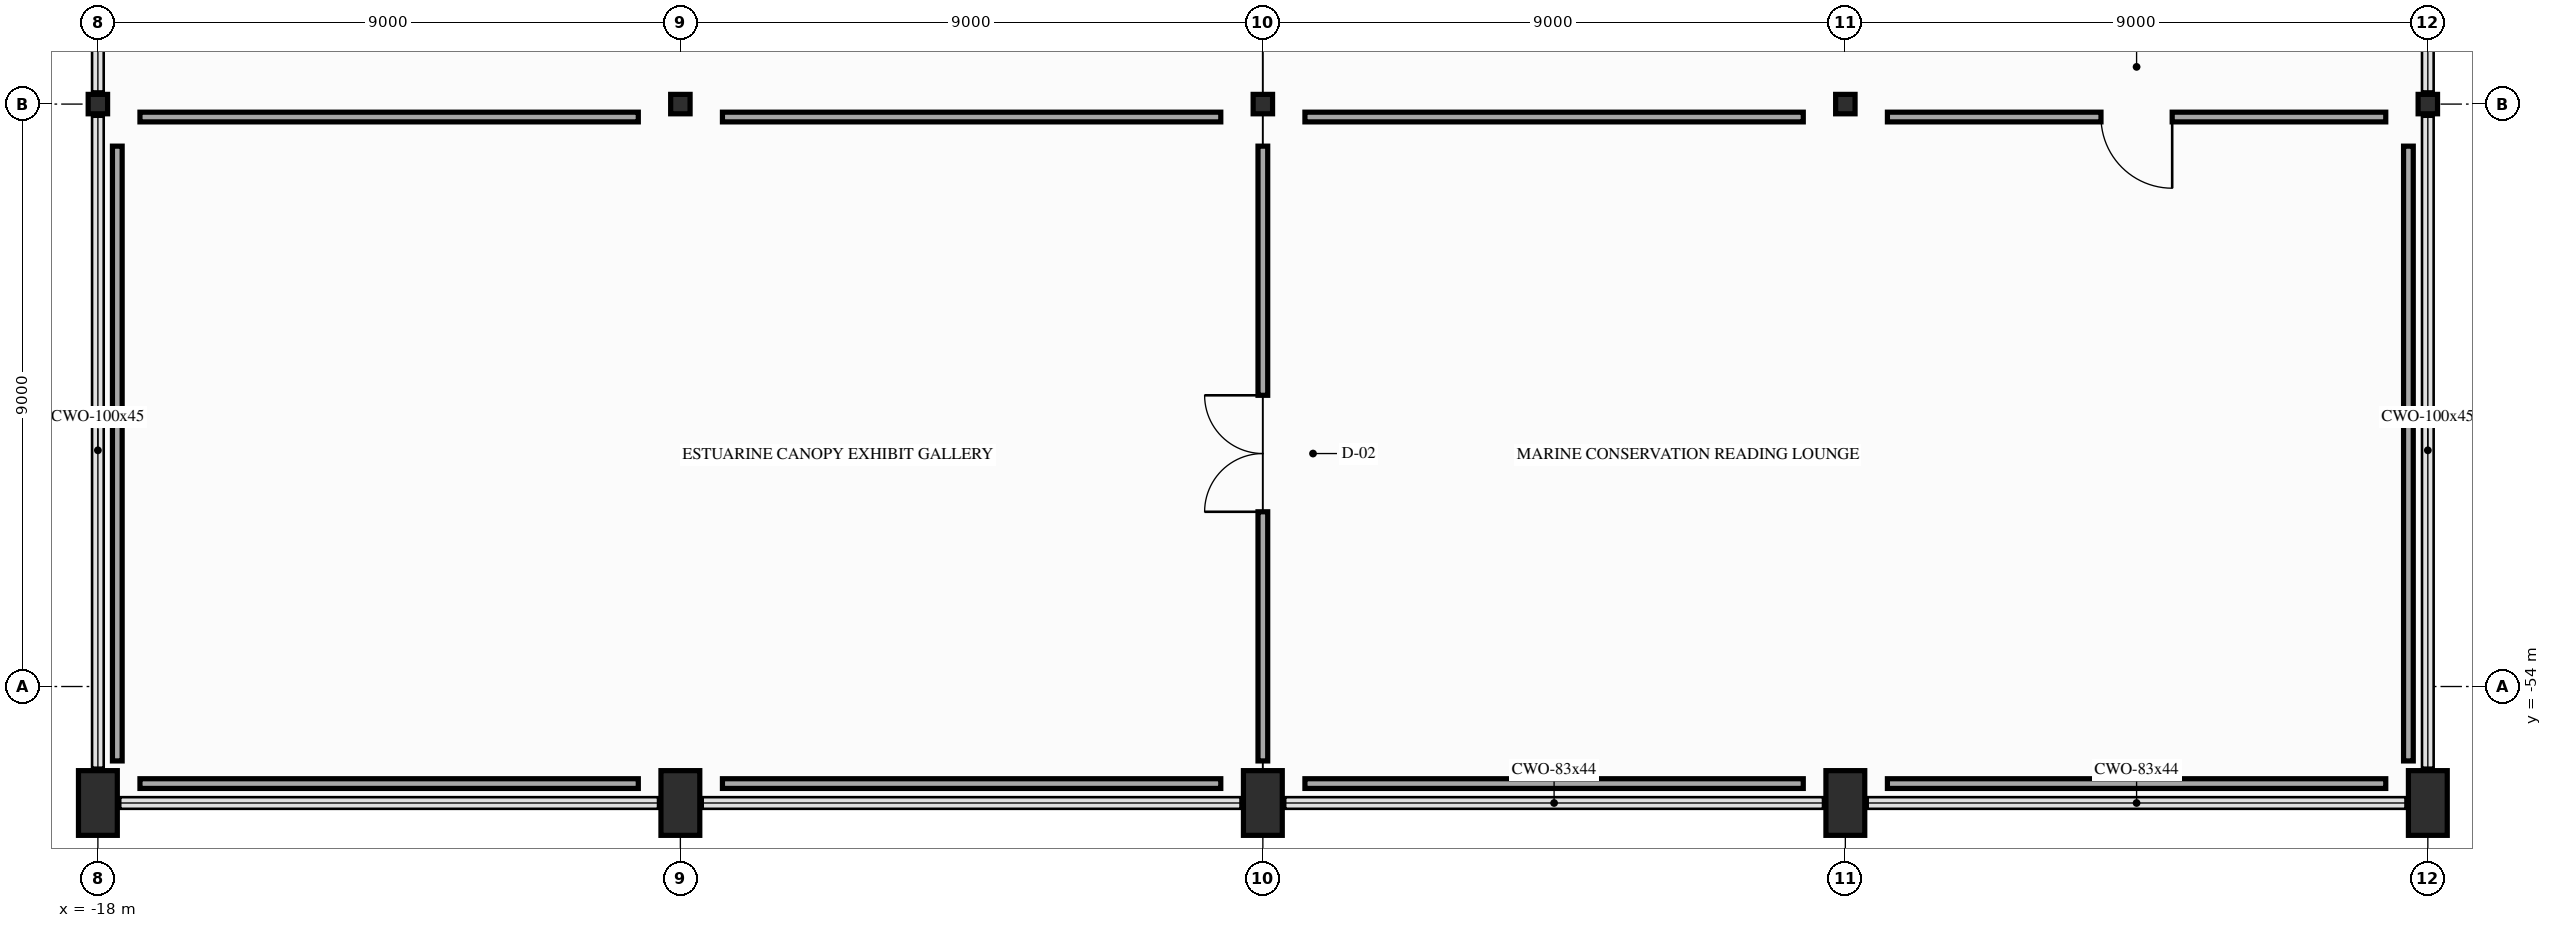
"""IFC4 building model, lengths in metres.
Left out: names, types, materials, properties, quantities, classifications, styles, units other than length and angle.
Written with IfcOpenShell. Run it as: python <this file> out.ifc"""

import sys

from ifc_helpers import new_model, si_unit, direction, frame, frame_2d, origin, origin_2d, place, context, subcontext, project, spatial, rectangle, i_section, extrude, element, fill, save


model = new_model("IFC4")
c1 = context("Model", 3, precision=1e-05, world=origin(), true_north=direction((0.0, 1.0)))
c2 = subcontext(c1, "Body", "Model", "MODEL_VIEW")
j1 = project(units=[si_unit("LENGTHUNIT", "METRE"), si_unit("PLANEANGLEUNIT", "RADIAN")], contexts=[c1])
p1 = place(None, origin())
s1 = spatial("IfcSite", under=j1, at=p1, CompositionType="ELEMENT")
p2 = place(p1, origin())
s2 = spatial("IfcBuilding", under=s1, at=p2, CompositionType="ELEMENT")
p3 = place(p2, frame((0.0, 0.0, 10.8)))
s3 = spatial("IfcBuildingStorey", under=s2, at=p3, CompositionType="ELEMENT", Elevation=10.8)
p4 = place(p3, frame((-18.0, -55.8, 0.0), z_axis=(0.0, 0.0, 1.0), x_axis=(1.0, 0.0, 0.0)))
e1 = element("IfcColumn", 1, at=p4, inside=s3, PredefinedType="PILASTER", context=c2, shape_type="SweptSolid", body=[
    extrude(rectangle(XDim=0.6, YDim=1.0, at=origin_2d()), origin(), (0.0, 0.0, 1.0), 5.4),
])
p5 = place(p3, frame((-18.0, -45.0, 0.0), z_axis=(0.0, 0.0, 1.0), x_axis=(1.0, 0.0, 0.0)))
e2 = element("IfcColumn", 2, at=p5, inside=s3, PredefinedType="COLUMN", context=c2, shape_type="SweptSolid", body=[
    extrude(i_section(OverallWidth=0.3, OverallDepth=0.3, WebThickness=0.01, FlangeThickness=0.015, FilletRadius=0.018, at=origin_2d()), origin(), (0.0, 0.0, 1.0), 5.4),
])
p6 = place(p3, frame((-9.0, -55.8, 0.0), z_axis=(0.0, 0.0, 1.0), x_axis=(1.0, 0.0, 0.0)))
e3 = element("IfcColumn", 3, at=p6, inside=s3, PredefinedType="PILASTER", context=c2, shape_type="SweptSolid", body=[
    extrude(rectangle(XDim=0.6, YDim=1.0, at=origin_2d()), origin(), (0.0, 0.0, 1.0), 5.4),
])
p7 = place(p3, frame((-9.0, -45.0, 0.0), z_axis=(0.0, 0.0, 1.0), x_axis=(1.0, 0.0, 0.0)))
e4 = element("IfcColumn", 4, at=p7, inside=s3, PredefinedType="COLUMN", context=c2, shape_type="SweptSolid", body=[
    extrude(i_section(OverallWidth=0.3, OverallDepth=0.3, WebThickness=0.01, FlangeThickness=0.015, FilletRadius=0.018, at=origin_2d()), origin(), (0.0, 0.0, 1.0), 5.4),
])
p8 = place(p3, frame((0.0, -55.8, 0.0), z_axis=(0.0, 0.0, 1.0), x_axis=(1.0, 0.0, 0.0)))
e5 = element("IfcColumn", 5, at=p8, inside=s3, PredefinedType="PILASTER", context=c2, shape_type="SweptSolid", body=[
    extrude(rectangle(XDim=0.6, YDim=1.0, at=origin_2d()), origin(), (0.0, 0.0, 1.0), 5.4),
])
p9 = place(p3, frame((0.0, -45.0, 0.0), z_axis=(0.0, 0.0, 1.0), x_axis=(1.0, 0.0, 0.0)))
e6 = element("IfcColumn", 6, at=p9, inside=s3, PredefinedType="COLUMN", context=c2, shape_type="SweptSolid", body=[
    extrude(i_section(OverallWidth=0.3, OverallDepth=0.3, WebThickness=0.01, FlangeThickness=0.015, FilletRadius=0.018, at=origin_2d()), origin(), (0.0, 0.0, 1.0), 5.4),
])
p10 = place(p3, frame((9.0, -55.8, 0.0), z_axis=(0.0, 0.0, 1.0), x_axis=(1.0, 0.0, 0.0)))
e7 = element("IfcColumn", 7, at=p10, inside=s3, PredefinedType="PILASTER", context=c2, shape_type="SweptSolid", body=[
    extrude(rectangle(XDim=0.6, YDim=1.0, at=origin_2d()), origin(), (0.0, 0.0, 1.0), 5.4),
])
p11 = place(p3, frame((9.0, -45.0, 0.0), z_axis=(0.0, 0.0, 1.0), x_axis=(1.0, 0.0, 0.0)))
e8 = element("IfcColumn", 8, at=p11, inside=s3, PredefinedType="COLUMN", context=c2, shape_type="SweptSolid", body=[
    extrude(i_section(OverallWidth=0.3, OverallDepth=0.3, WebThickness=0.01, FlangeThickness=0.015, FilletRadius=0.018, at=origin_2d()), origin(), (0.0, 0.0, 1.0), 5.4),
])
p12 = place(p3, frame((18.0, -55.8, 0.0), z_axis=(0.0, 0.0, 1.0), x_axis=(1.0, 0.0, 0.0)))
e9 = element("IfcColumn", 9, at=p12, inside=s3, PredefinedType="PILASTER", context=c2, shape_type="SweptSolid", body=[
    extrude(rectangle(XDim=0.6, YDim=1.0, at=origin_2d()), origin(), (0.0, 0.0, 1.0), 5.4),
])
p13 = place(p3, frame((18.0, -45.0, 0.0), z_axis=(0.0, 0.0, 1.0), x_axis=(1.0, 0.0, 0.0)))
e10 = element("IfcColumn", 10, at=p13, inside=s3, PredefinedType="COLUMN", context=c2, shape_type="SweptSolid", body=[
    extrude(i_section(OverallWidth=0.3, OverallDepth=0.3, WebThickness=0.01, FlangeThickness=0.015, FilletRadius=0.018, at=origin_2d()), origin(), (0.0, 0.0, 1.0), 5.4),
])
for number, where, z_axis, x_axis in (
    (11, (-17.35, -55.5, 0.0), (0.0, 0.0, 1.0), (1.0, 0.0, 0.0)),
    (12, (-8.35, -55.5, 0.0), (0.0, 0.0, 1.0), (1.0, 0.0, 0.0)),
):
    element("IfcWall", number, at=place(p3, frame(where, z_axis=z_axis, x_axis=x_axis)), inside=s3, PredefinedType="PARTITIONING", context=c2, shape_type="SweptSolid", body=[
        extrude(rectangle(XDim=7.7, YDim=0.15, at=frame_2d((3.85, 0.0))), origin(), (0.0, 0.0, 1.0), 4.447),
    ])
p14 = place(p3, frame((0.0, -55.15, 0.0), z_axis=(0.0, 0.0, 1.0), x_axis=(0.0, 1.0, 0.0)))
e13 = element("IfcWall", 13, at=p14, inside=s3, PredefinedType="PARTITIONING", context=c2, shape_type="SweptSolid", body=[
    extrude(rectangle(XDim=9.5, YDim=0.15, at=frame_2d((4.75, 0.0))), origin(), (0.0, 0.0, 1.0), 4.535),
])
p15 = place(p14, frame((3.85, 0.0, 0.0)))
e14 = element("IfcOpeningElement", 14, at=p15, cuts=e13, PredefinedType="OPENING", context=c2, shape_type="SweptSolid", body=[
    extrude(rectangle(XDim=1.8, YDim=2.3, at=frame_2d((0.9, 1.15))), frame((0.0, 0.085, 0.0), z_axis=(0.0, -1.0, 0.0), x_axis=(1.0, 0.0, 0.0)), (0.0, 0.0, 1.0), 0.17),
])
for number, where, z_axis, x_axis in (
    (15, (-0.65, -45.2, 0.0), (0.0, 0.0, 1.0), (-1.0, 0.0, 0.0)),
    (16, (-9.65, -45.2, 0.0), (0.0, 0.0, 1.0), (-1.0, 0.0, 0.0)),
):
    element("IfcWall", number, at=place(p3, frame(where, z_axis=z_axis, x_axis=x_axis)), inside=s3, PredefinedType="PARTITIONING", context=c2, shape_type="SweptSolid", body=[
        extrude(rectangle(XDim=7.7, YDim=0.15, at=frame_2d((3.85, 0.0))), origin(), (0.0, 0.0, 1.0), 4.447),
    ])
p16 = place(p3, frame((-17.7, -45.65, 0.0), z_axis=(0.0, 0.0, 1.0), x_axis=(0.0, -1.0, 0.0)))
e17 = element("IfcWall", 17, at=p16, inside=s3, PredefinedType="PARTITIONING", context=c2, shape_type="SweptSolid", body=[
    extrude(rectangle(XDim=9.5, YDim=0.15, at=frame_2d((4.75, 0.0))), origin(), (0.0, 0.0, 1.0), 4.535),
])
for number, where, z_axis, x_axis in (
    (18, (0.65, -55.5, 0.0), (0.0, 0.0, 1.0), (1.0, 0.0, 0.0)),
    (19, (9.65, -55.5, 0.0), (0.0, 0.0, 1.0), (1.0, 0.0, 0.0)),
):
    element("IfcWall", number, at=place(p3, frame(where, z_axis=z_axis, x_axis=x_axis)), inside=s3, PredefinedType="PARTITIONING", context=c2, shape_type="SweptSolid", body=[
        extrude(rectangle(XDim=7.7, YDim=0.15, at=frame_2d((3.85, 0.0))), origin(), (0.0, 0.0, 1.0), 4.447),
    ])
p17 = place(p3, frame((17.7, -55.15, 0.0), z_axis=(0.0, 0.0, 1.0), x_axis=(0.0, 1.0, 0.0)))
e20 = element("IfcWall", 20, at=p17, inside=s3, PredefinedType="PARTITIONING", context=c2, shape_type="SweptSolid", body=[
    extrude(rectangle(XDim=9.5, YDim=0.15, at=frame_2d((4.75, 0.0))), origin(), (0.0, 0.0, 1.0), 4.535),
])
p18 = place(p3, frame((17.35, -45.2, 0.0), z_axis=(0.0, 0.0, 1.0), x_axis=(-1.0, 0.0, 0.0)))
e21 = element("IfcWall", 21, at=p18, inside=s3, PredefinedType="PARTITIONING", context=c2, shape_type="SweptSolid", body=[
    extrude(rectangle(XDim=7.7, YDim=0.15, at=frame_2d((3.85, 0.0))), origin(), (0.0, 0.0, 1.0), 4.447),
])
p19 = place(p18, frame((3.3, 0.0, 0.0)))
e22 = element("IfcOpeningElement", 22, at=p19, cuts=e21, PredefinedType="OPENING", context=c2, shape_type="SweptSolid", body=[
    extrude(rectangle(XDim=1.1, YDim=2.15, at=frame_2d((0.55, 1.075))), frame((0.0, 0.085, 0.0), z_axis=(0.0, -1.0, 0.0), x_axis=(1.0, 0.0, 0.0)), (0.0, 0.0, 1.0), 0.17),
])
p20 = place(p3, frame((8.35, -45.2, 0.0), z_axis=(0.0, 0.0, 1.0), x_axis=(-1.0, 0.0, 0.0)))
e23 = element("IfcWall", 23, at=p20, inside=s3, PredefinedType="PARTITIONING", context=c2, shape_type="SweptSolid", body=[
    extrude(rectangle(XDim=7.7, YDim=0.15, at=frame_2d((3.85, 0.0))), origin(), (0.0, 0.0, 1.0), 4.447),
])
p21 = place(p15, origin())
e24 = element("IfcDoor", 24, at=p21, inside=s3, OperationType="DOUBLE_DOOR_SINGLE_SWING", PredefinedType="DOOR", context=c2, shape_type="SweptSolid", body=[
    extrude(rectangle(XDim=1.8, YDim=2.3, at=frame_2d((0.9, 1.15))), frame((0.0, 0.025, 0.0), z_axis=(0.0, -1.0, 0.0), x_axis=(1.0, 0.0, 0.0)), (0.0, 0.0, 1.0), 0.05),
])
fill(e14, e24)
p22 = place(p19, origin())
e25 = element("IfcDoor", 25, at=p22, inside=s3, OperationType="SINGLE_SWING_LEFT", PredefinedType="DOOR", context=c2, shape_type="SweptSolid", body=[
    extrude(rectangle(XDim=1.1, YDim=2.15, at=frame_2d((0.55, 1.075))), frame((0.0, 0.025, 0.0), z_axis=(0.0, -1.0, 0.0), x_axis=(1.0, 0.0, 0.0)), (0.0, 0.0, 1.0), 0.05),
])
fill(e22, e25)
save(model, sys.argv[1])
